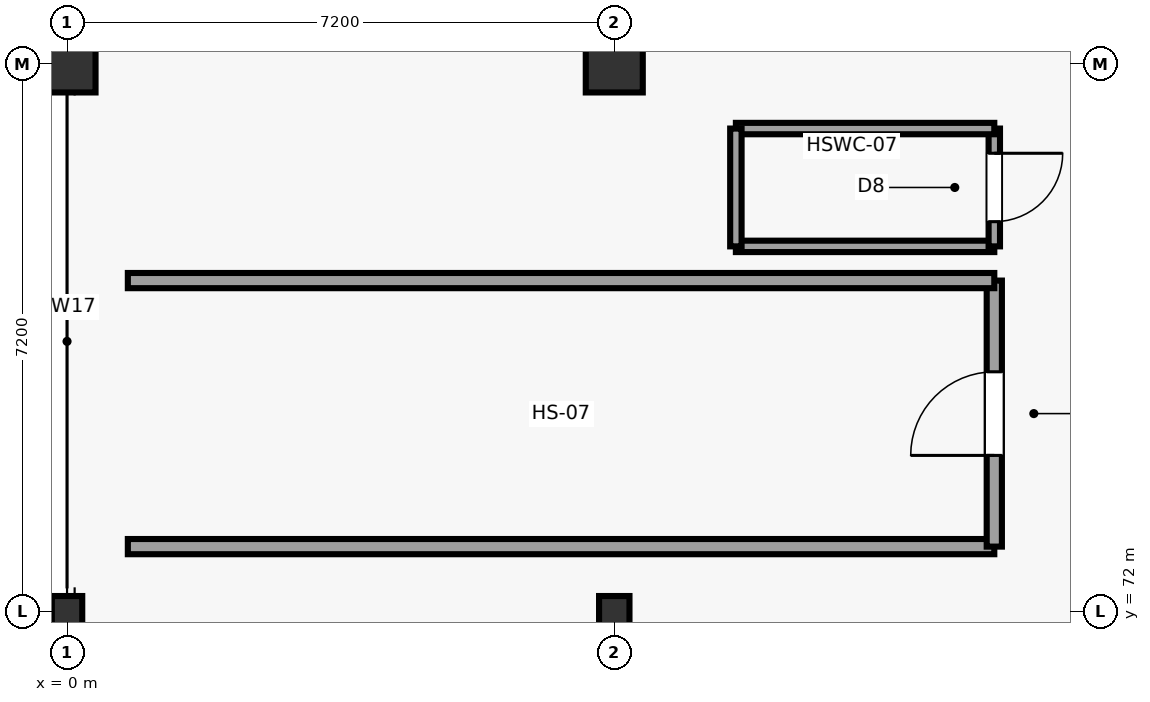
"""IFC4 building model, lengths in metres.
Left out: names, types, materials, properties, quantities, classifications, styles, units other than length and angle.
Written with IfcOpenShell. Run it as: python <this file> out.ifc"""

import sys

from ifc_helpers import new_model, si_unit, direction, frame, frame_2d, origin, origin_2d, place, context, subcontext, project, spatial, rectangle, hollow_rectangle, extrude, element, fill, save


model = new_model("IFC4")
c1 = context("Model", 3, precision=1e-05, world=origin(), true_north=direction((0.0, 1.0)))
c2 = subcontext(c1, "Body", "Model", "MODEL_VIEW")
j1 = project(units=[si_unit("LENGTHUNIT", "METRE"), si_unit("PLANEANGLEUNIT", "RADIAN")], contexts=[c1])
p1 = place(None, origin())
s1 = spatial("IfcSite", under=j1, at=p1, CompositionType="ELEMENT")
p2 = place(p1, origin())
s2 = spatial("IfcBuilding", under=s1, at=p2, CompositionType="ELEMENT")
p3 = place(p2, frame((0.0, 0.0, 9.6)))
s3 = spatial("IfcBuildingStorey", under=s2, at=p3, CompositionType="ELEMENT", Elevation=9.6)
p4 = place(p3, frame((0.0, 72.0, 0.0), z_axis=(0.0, 0.0, 1.0), x_axis=(1.0, 0.0, 0.0)))
e1 = element("IfcColumn", 1, at=p4, inside=s3, PredefinedType="COLUMN", context=c2, shape_type="SweptSolid", body=[
    extrude(hollow_rectangle(XDim=0.4, YDim=0.4, WallThickness=0.02, at=origin_2d()), origin(), (0.0, 0.0, 1.0), 4.2),
])
p5 = place(p3, frame((0.0, 79.2, 0.0), z_axis=(0.0, 0.0, 1.0), x_axis=(1.0, 0.0, 0.0)))
e2 = element("IfcColumn", 2, at=p5, inside=s3, PredefinedType="COLUMN", context=c2, shape_type="SweptSolid", body=[
    extrude(rectangle(XDim=0.75, YDim=0.75, at=origin_2d()), origin(), (0.0, 0.0, 1.0), 4.2),
])
p6 = place(p3, frame((7.2, 72.0, 0.0), z_axis=(0.0, 0.0, 1.0), x_axis=(1.0, 0.0, 0.0)))
e3 = element("IfcColumn", 3, at=p6, inside=s3, PredefinedType="COLUMN", context=c2, shape_type="SweptSolid", body=[
    extrude(hollow_rectangle(XDim=0.4, YDim=0.4, WallThickness=0.02, at=origin_2d()), origin(), (0.0, 0.0, 1.0), 4.2),
])
p7 = place(p3, frame((7.2, 79.2, 0.0), z_axis=(0.0, 0.0, 1.0), x_axis=(1.0, 0.0, 0.0)))
e4 = element("IfcColumn", 4, at=p7, inside=s3, PredefinedType="COLUMN", context=c2, shape_type="SweptSolid", body=[
    extrude(rectangle(XDim=0.75, YDim=0.75, at=origin_2d()), origin(), (0.0, 0.0, 1.0), 4.2),
])
p8 = place(p3, frame((0.8, 72.85, 0.0), z_axis=(0.0, 0.0, 1.0), x_axis=(1.0, 0.0, 0.0)))
e5 = element("IfcWall", 5, at=p8, inside=s3, PredefinedType="PARTITIONING", context=c2, shape_type="SweptSolid", body=[
    extrude(rectangle(XDim=11.4, YDim=0.2, at=frame_2d((5.7, 0.0))), origin(), (0.0, 0.0, 1.0), 2.94),
])
p9 = place(p3, frame((12.2, 72.85, 0.0), z_axis=(0.0, 0.0, 1.0), x_axis=(0.0, 1.0, 0.0)))
e6 = element("IfcWall", 6, at=p9, inside=s3, PredefinedType="PARTITIONING", context=c2, shape_type="SweptSolid", body=[
    extrude(rectangle(XDim=3.5, YDim=0.2, at=frame_2d((1.75, 0.0))), origin(), (0.0, 0.0, 1.0), 2.94),
])
p10 = place(p9, frame((1.2, 0.0, 0.0)))
e7 = element("IfcOpeningElement", 7, at=p10, cuts=e6, PredefinedType="OPENING", context=c2, shape_type="SweptSolid", body=[
    extrude(rectangle(XDim=1.1, YDim=2.25, at=frame_2d((0.55, 1.125))), frame((0.0, 0.11, 0.0), z_axis=(0.0, -1.0, 0.0), x_axis=(1.0, 0.0, 0.0)), (0.0, 0.0, 1.0), 0.22),
])
p11 = place(p3, frame((12.2, 76.35, 0.0), z_axis=(0.0, 0.0, 1.0), x_axis=(-1.0, 0.0, 0.0)))
e8 = element("IfcWall", 8, at=p11, inside=s3, PredefinedType="PARTITIONING", context=c2, shape_type="SweptSolid", body=[
    extrude(rectangle(XDim=11.4, YDim=0.2, at=frame_2d((5.7, 0.0))), origin(), (0.0, 0.0, 1.0), 2.94),
])
p12 = place(p3, frame((8.8, 76.8, 0.0), z_axis=(0.0, 0.0, 1.0), x_axis=(1.0, 0.0, 0.0)))
e9 = element("IfcWall", 9, at=p12, inside=s3, PredefinedType="PARTITIONING", context=c2, shape_type="SweptSolid", body=[
    extrude(rectangle(XDim=3.4, YDim=0.15, at=frame_2d((1.7, 0.0))), origin(), (0.0, 0.0, 1.0), 2.94),
])
p13 = place(p3, frame((12.2, 76.8, 0.0), z_axis=(0.0, 0.0, 1.0), x_axis=(0.0, 1.0, 0.0)))
e10 = element("IfcWall", 10, at=p13, inside=s3, PredefinedType="PARTITIONING", context=c2, shape_type="SweptSolid", body=[
    extrude(rectangle(XDim=1.55, YDim=0.15, at=frame_2d((0.775, 0.0))), origin(), (0.0, 0.0, 1.0), 2.94),
])
p14 = place(p13, frame((0.325, 0.0, 0.0)))
e11 = element("IfcOpeningElement", 11, at=p14, cuts=e10, PredefinedType="OPENING", context=c2, shape_type="SweptSolid", body=[
    extrude(rectangle(XDim=0.9, YDim=2.15, at=frame_2d((0.45, 1.075))), frame((0.0, 0.085, 0.0), z_axis=(0.0, -1.0, 0.0), x_axis=(1.0, 0.0, 0.0)), (0.0, 0.0, 1.0), 0.17),
])
p15 = place(p3, frame((12.2, 78.35, 0.0), z_axis=(0.0, 0.0, 1.0), x_axis=(-1.0, 0.0, 0.0)))
e12 = element("IfcWall", 12, at=p15, inside=s3, PredefinedType="PARTITIONING", context=c2, shape_type="SweptSolid", body=[
    extrude(rectangle(XDim=3.4, YDim=0.15, at=frame_2d((1.7, 0.0))), origin(), (0.0, 0.0, 1.0), 2.94),
])
p16 = place(p3, frame((8.8, 78.35, 0.0), z_axis=(0.0, 0.0, 1.0), x_axis=(0.0, -1.0, 0.0)))
e13 = element("IfcWall", 13, at=p16, inside=s3, PredefinedType="PARTITIONING", context=c2, shape_type="SweptSolid", body=[
    extrude(rectangle(XDim=1.55, YDim=0.15, at=frame_2d((0.775, 0.0))), origin(), (0.0, 0.0, 1.0), 2.94),
])
p17 = place(p10, origin())
e14 = element("IfcDoor", 14, at=p17, inside=s3, OperationType="SINGLE_SWING_LEFT", PredefinedType="DOOR", context=c2, shape_type="SweptSolid", body=[
    extrude(rectangle(XDim=1.1, YDim=2.25, at=frame_2d((0.55, 1.125))), frame((0.0, 0.025, 0.0), z_axis=(0.0, -1.0, 0.0), x_axis=(1.0, 0.0, 0.0)), (0.0, 0.0, 1.0), 0.05),
])
fill(e7, e14)
p18 = place(p14, frame((0.9, 0.0, 0.0), z_axis=(0.0, 0.0, 1.0), x_axis=(-1.0, 0.0, 0.0)))
e15 = element("IfcDoor", 15, at=p18, inside=s3, OperationType="SINGLE_SWING_RIGHT", PredefinedType="DOOR", context=c2, shape_type="SweptSolid", body=[
    extrude(rectangle(XDim=0.9, YDim=2.15, at=frame_2d((0.45, 1.075))), frame((0.0, 0.025, 0.0), z_axis=(0.0, -1.0, 0.0), x_axis=(1.0, 0.0, 0.0)), (0.0, 0.0, 1.0), 0.05),
])
fill(e11, e15)
save(model, sys.argv[1])
